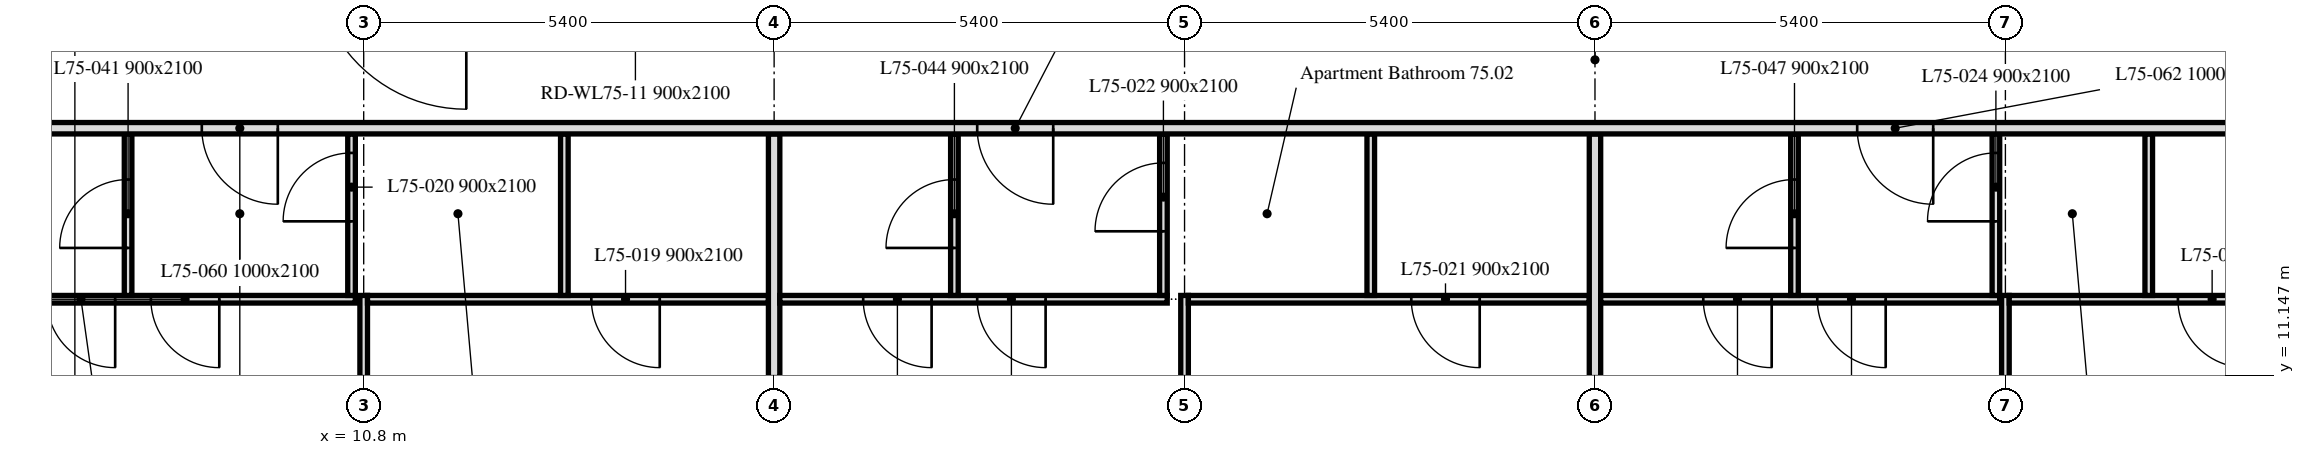
"""IFC4 building model, lengths in metres.
Left out: names, types, materials, properties, quantities, classifications, styles, units other than length and angle.
Written with IfcOpenShell. Run it as: python <this file> out.ifc"""

import sys

from ifc_helpers import new_model, si_unit, direction, frame, frame_2d, origin, place, context, subcontext, project, spatial, rectangle, extrude, element, fill, save


model = new_model("IFC4")
c1 = context("Model", 3, precision=1e-05, world=origin(), true_north=direction((0.0, 1.0)))
c2 = subcontext(c1, "Body", "Model", "MODEL_VIEW")
j1 = project(units=[si_unit("LENGTHUNIT", "METRE"), si_unit("PLANEANGLEUNIT", "RADIAN")], contexts=[c1])
p1 = place(None, origin())
s1 = spatial("IfcSite", under=j1, at=p1, CompositionType="ELEMENT")
p2 = place(p1, origin())
s2 = spatial("IfcBuilding", under=s1, at=p2, CompositionType="ELEMENT")
p3 = place(p2, frame((0.0, 0.0, 301.6)))
s3 = spatial("IfcBuildingStorey", under=s2, at=p3, CompositionType="ELEMENT", Elevation=301.6)
p4 = place(p3, frame((10.8, 11.12, 0.0), z_axis=(0.0, 0.0, 1.0), x_axis=(0.0, 1.0, 0.0)))
e1 = element("IfcWall", 1, at=p4, inside=s3, PredefinedType="PARTITIONING", context=c2, shape_type="SweptSolid", body=[
    extrude(rectangle(XDim=1.08, YDim=0.1, at=frame_2d((0.54, 0.0))), origin(), (0.0, 0.0, 1.0), 3.0),
])
p5 = place(p3, frame((10.69, 12.15, 0.0), z_axis=(0.0, 0.0, 1.0), x_axis=(-1.0, 0.0, 0.0)))
e2 = element("IfcWall", 2, at=p5, inside=s3, PredefinedType="PARTITIONING", context=c2, shape_type="SweptSolid", body=[
    extrude(rectangle(XDim=4.539, YDim=0.1, at=frame_2d((2.27, 0.0))), origin(), (0.0, 0.0, 1.0), 3.0),
])
p6 = place(p5, frame((3.16, 0.0, 0.0)))
e3 = element("IfcOpeningElement", 3, at=p6, cuts=e2, PredefinedType="OPENING", context=c2, shape_type="SweptSolid", body=[
    extrude(rectangle(XDim=0.9, YDim=2.1, at=frame_2d((0.45, 1.05))), frame((0.0, 0.05, 0.0), z_axis=(0.0, -1.0, 0.0), x_axis=(1.0, 0.0, 0.0)), (0.0, 0.0, 1.0), 0.1),
])
p7 = place(p5, frame((1.79, 0.0, 0.0)))
e4 = element("IfcOpeningElement", 4, at=p7, cuts=e2, PredefinedType="OPENING", context=c2, shape_type="SweptSolid", body=[
    extrude(rectangle(XDim=0.9, YDim=2.1, at=frame_2d((0.45, 1.05))), frame((0.0, 0.05, 0.0), z_axis=(0.0, -1.0, 0.0), x_axis=(1.0, 0.0, 0.0)), (0.0, 0.0, 1.0), 0.1),
])
p8 = place(p3, frame((16.125, 12.15, 0.0), z_axis=(0.0, 0.0, 1.0), x_axis=(-1.0, 0.0, 0.0)))
e5 = element("IfcWall", 5, at=p8, inside=s3, PredefinedType="PARTITIONING", context=c2, shape_type="SweptSolid", body=[
    extrude(rectangle(XDim=5.275, YDim=0.1, at=frame_2d((2.637, 0.0))), origin(), (0.0, 0.0, 1.0), 3.0),
])
p9 = place(p8, frame((1.43, 0.0, 0.0)))
e6 = element("IfcOpeningElement", 6, at=p9, cuts=e5, PredefinedType="OPENING", context=c2, shape_type="SweptSolid", body=[
    extrude(rectangle(XDim=0.9, YDim=2.1, at=frame_2d((0.45, 1.05))), frame((0.0, 0.05, 0.0), z_axis=(0.0, -1.0, 0.0), x_axis=(1.0, 0.0, 0.0)), (0.0, 0.0, 1.0), 0.1),
])
p10 = place(p3, frame((7.7, 12.2, 0.0), z_axis=(0.0, 0.0, 1.0), x_axis=(0.0, 1.0, 0.0)))
e7 = element("IfcWall", 7, at=p10, inside=s3, PredefinedType="PARTITIONING", context=c2, shape_type="SweptSolid", body=[
    extrude(rectangle(XDim=2.125, YDim=0.1, at=frame_2d((1.062, 0.0))), origin(), (0.0, 0.0, 1.0), 3.0),
])
p11 = place(p10, frame((0.625, 0.0, 0.0)))
e8 = element("IfcOpeningElement", 8, at=p11, cuts=e7, PredefinedType="OPENING", context=c2, shape_type="SweptSolid", body=[
    extrude(rectangle(XDim=0.9, YDim=2.1, at=frame_2d((0.45, 1.05))), frame((0.0, 0.05, 0.0), z_axis=(0.0, -1.0, 0.0), x_axis=(1.0, 0.0, 0.0)), (0.0, 0.0, 1.0), 0.1),
])
p12 = place(p3, frame((10.64, 12.2, 0.0), z_axis=(0.0, 0.0, 1.0), x_axis=(0.0, 1.0, 0.0)))
e9 = element("IfcWall", 9, at=p12, inside=s3, PredefinedType="PARTITIONING", context=c2, shape_type="SweptSolid", body=[
    extrude(rectangle(XDim=2.125, YDim=0.1, at=frame_2d((1.062, 0.0))), origin(), (0.0, 0.0, 1.0), 3.0),
])
p13 = place(p12, frame((0.975, 0.0, 0.0)))
e10 = element("IfcOpeningElement", 10, at=p13, cuts=e9, PredefinedType="OPENING", context=c2, shape_type="SweptSolid", body=[
    extrude(rectangle(XDim=0.9, YDim=2.1, at=frame_2d((0.45, 1.05))), frame((0.0, 0.05, 0.0), z_axis=(0.0, -1.0, 0.0), x_axis=(1.0, 0.0, 0.0)), (0.0, 0.0, 1.0), 0.1),
])
p14 = place(p3, frame((13.44, 12.2, 0.0), z_axis=(0.0, 0.0, 1.0), x_axis=(0.0, 1.0, 0.0)))
e11 = element("IfcWall", 11, at=p14, inside=s3, PredefinedType="PARTITIONING", context=c2, shape_type="SweptSolid", body=[
    extrude(rectangle(XDim=2.125, YDim=0.1, at=frame_2d((1.062, 0.0))), origin(), (0.0, 0.0, 1.0), 3.0),
])
p15 = place(p3, frame((16.2, 11.12, 0.0), z_axis=(0.0, 0.0, 1.0), x_axis=(0.0, 1.0, 0.0)))
e12 = element("IfcWall", 12, at=p15, inside=s3, PredefinedType="PARTITIONING", context=c2, shape_type="SweptSolid", body=[
    extrude(rectangle(XDim=3.205, YDim=0.15, at=frame_2d((1.603, 0.0))), origin(), (0.0, 0.0, 1.0), 3.0),
])
p16 = place(p3, frame((21.6, 11.12, 0.0), z_axis=(0.0, 0.0, 1.0), x_axis=(0.0, 1.0, 0.0)))
e13 = element("IfcWall", 13, at=p16, inside=s3, PredefinedType="PARTITIONING", context=c2, shape_type="SweptSolid", body=[
    extrude(rectangle(XDim=1.08, YDim=0.1, at=frame_2d((0.54, 0.0))), origin(), (0.0, 0.0, 1.0), 3.0),
])
p17 = place(p3, frame((21.372, 12.15, 0.0), z_axis=(0.0, 0.0, 1.0), x_axis=(-1.0, 0.0, 0.0)))
e14 = element("IfcWall", 14, at=p17, inside=s3, PredefinedType="PARTITIONING", context=c2, shape_type="SweptSolid", body=[
    extrude(rectangle(XDim=5.097, YDim=0.1, at=frame_2d((2.549, 0.0))), origin(), (0.0, 0.0, 1.0), 3.0),
])
p18 = place(p17, frame((3.1, 0.0, 0.0)))
e15 = element("IfcOpeningElement", 15, at=p18, cuts=e14, PredefinedType="OPENING", context=c2, shape_type="SweptSolid", body=[
    extrude(rectangle(XDim=0.9, YDim=2.1, at=frame_2d((0.45, 1.05))), frame((0.0, 0.05, 0.0), z_axis=(0.0, -1.0, 0.0), x_axis=(1.0, 0.0, 0.0)), (0.0, 0.0, 1.0), 0.1),
])
p19 = place(p17, frame((1.6, 0.0, 0.0)))
e16 = element("IfcOpeningElement", 16, at=p19, cuts=e14, PredefinedType="OPENING", context=c2, shape_type="SweptSolid", body=[
    extrude(rectangle(XDim=0.9, YDim=2.1, at=frame_2d((0.45, 1.05))), frame((0.0, 0.05, 0.0), z_axis=(0.0, -1.0, 0.0), x_axis=(1.0, 0.0, 0.0)), (0.0, 0.0, 1.0), 0.1),
])
p20 = place(p3, frame((26.925, 12.15, 0.0), z_axis=(0.0, 0.0, 1.0), x_axis=(-1.0, 0.0, 0.0)))
e17 = element("IfcWall", 17, at=p20, inside=s3, PredefinedType="PARTITIONING", context=c2, shape_type="SweptSolid", body=[
    extrude(rectangle(XDim=5.275, YDim=0.1, at=frame_2d((2.638, 0.0))), origin(), (0.0, 0.0, 1.0), 3.0),
])
p21 = place(p20, frame((1.442, 0.0, 0.0)))
e18 = element("IfcOpeningElement", 18, at=p21, cuts=e17, PredefinedType="OPENING", context=c2, shape_type="SweptSolid", body=[
    extrude(rectangle(XDim=0.9, YDim=2.1, at=frame_2d((0.45, 1.05))), frame((0.0, 0.05, 0.0), z_axis=(0.0, -1.0, 0.0), x_axis=(1.0, 0.0, 0.0)), (0.0, 0.0, 1.0), 0.1),
])
p22 = place(p3, frame((18.572, 12.2, 0.0), z_axis=(0.0, 0.0, 1.0), x_axis=(0.0, 1.0, 0.0)))
e19 = element("IfcWall", 19, at=p22, inside=s3, PredefinedType="PARTITIONING", context=c2, shape_type="SweptSolid", body=[
    extrude(rectangle(XDim=2.125, YDim=0.1, at=frame_2d((1.062, 0.0))), origin(), (0.0, 0.0, 1.0), 3.0),
])
p23 = place(p22, frame((0.625, 0.0, 0.0)))
e20 = element("IfcOpeningElement", 20, at=p23, cuts=e19, PredefinedType="OPENING", context=c2, shape_type="SweptSolid", body=[
    extrude(rectangle(XDim=0.9, YDim=2.1, at=frame_2d((0.45, 1.05))), frame((0.0, 0.05, 0.0), z_axis=(0.0, -1.0, 0.0), x_axis=(1.0, 0.0, 0.0)), (0.0, 0.0, 1.0), 0.1),
])
p24 = place(p3, frame((21.322, 12.2, 0.0), z_axis=(0.0, 0.0, 1.0), x_axis=(0.0, 1.0, 0.0)))
e21 = element("IfcWall", 21, at=p24, inside=s3, PredefinedType="PARTITIONING", context=c2, shape_type="SweptSolid", body=[
    extrude(rectangle(XDim=2.125, YDim=0.1, at=frame_2d((1.062, 0.0))), origin(), (0.0, 0.0, 1.0), 3.0),
])
p25 = place(p24, frame((0.844, 0.0, 0.0)))
e22 = element("IfcOpeningElement", 22, at=p25, cuts=e21, PredefinedType="OPENING", context=c2, shape_type="SweptSolid", body=[
    extrude(rectangle(XDim=0.9, YDim=2.1, at=frame_2d((0.45, 1.05))), frame((0.0, 0.05, 0.0), z_axis=(0.0, -1.0, 0.0), x_axis=(1.0, 0.0, 0.0)), (0.0, 0.0, 1.0), 0.1),
])
p26 = place(p3, frame((24.05, 12.2, 0.0), z_axis=(0.0, 0.0, 1.0), x_axis=(0.0, 1.0, 0.0)))
e23 = element("IfcWall", 23, at=p26, inside=s3, PredefinedType="PARTITIONING", context=c2, shape_type="SweptSolid", body=[
    extrude(rectangle(XDim=2.125, YDim=0.1, at=frame_2d((1.062, 0.0))), origin(), (0.0, 0.0, 1.0), 3.0),
])
p27 = place(p3, frame((27.0, 11.12, 0.0), z_axis=(0.0, 0.0, 1.0), x_axis=(0.0, 1.0, 0.0)))
e24 = element("IfcWall", 24, at=p27, inside=s3, PredefinedType="PARTITIONING", context=c2, shape_type="SweptSolid", body=[
    extrude(rectangle(XDim=3.205, YDim=0.15, at=frame_2d((1.603, 0.0))), origin(), (0.0, 0.0, 1.0), 3.0),
])
p28 = place(p3, frame((32.4, 11.12, 0.0), z_axis=(0.0, 0.0, 1.0), x_axis=(0.0, 1.0, 0.0)))
e25 = element("IfcWall", 25, at=p28, inside=s3, PredefinedType="PARTITIONING", context=c2, shape_type="SweptSolid", body=[
    extrude(rectangle(XDim=1.08, YDim=0.1, at=frame_2d((0.54, 0.0))), origin(), (0.0, 0.0, 1.0), 3.0),
])
p29 = place(p3, frame((32.325, 12.15, 0.0), z_axis=(0.0, 0.0, 1.0), x_axis=(-1.0, 0.0, 0.0)))
e26 = element("IfcWall", 26, at=p29, inside=s3, PredefinedType="PARTITIONING", context=c2, shape_type="SweptSolid", body=[
    extrude(rectangle(XDim=5.25, YDim=0.1, at=frame_2d((2.625, 0.0))), origin(), (0.0, 0.0, 1.0), 3.0),
])
p30 = place(p29, frame((3.0, 0.0, 0.0)))
e27 = element("IfcOpeningElement", 27, at=p30, cuts=e26, PredefinedType="OPENING", context=c2, shape_type="SweptSolid", body=[
    extrude(rectangle(XDim=0.9, YDim=2.1, at=frame_2d((0.45, 1.05))), frame((0.0, 0.05, 0.0), z_axis=(0.0, -1.0, 0.0), x_axis=(1.0, 0.0, 0.0)), (0.0, 0.0, 1.0), 0.1),
])
p31 = place(p29, frame((1.5, 0.0, 0.0)))
e28 = element("IfcOpeningElement", 28, at=p31, cuts=e26, PredefinedType="OPENING", context=c2, shape_type="SweptSolid", body=[
    extrude(rectangle(XDim=0.9, YDim=2.1, at=frame_2d((0.45, 1.05))), frame((0.0, 0.05, 0.0), z_axis=(0.0, -1.0, 0.0), x_axis=(1.0, 0.0, 0.0)), (0.0, 0.0, 1.0), 0.1),
])
p32 = place(p3, frame((37.725, 12.15, 0.0), z_axis=(0.0, 0.0, 1.0), x_axis=(-1.0, 0.0, 0.0)))
e29 = element("IfcWall", 29, at=p32, inside=s3, PredefinedType="PARTITIONING", context=c2, shape_type="SweptSolid", body=[
    extrude(rectangle(XDim=5.275, YDim=0.1, at=frame_2d((2.638, 0.0))), origin(), (0.0, 0.0, 1.0), 3.0),
])
p33 = place(p32, frame((2.155, 0.0, 0.0)))
e30 = element("IfcOpeningElement", 30, at=p33, cuts=e29, PredefinedType="OPENING", context=c2, shape_type="SweptSolid", body=[
    extrude(rectangle(XDim=0.9, YDim=2.1, at=frame_2d((0.45, 1.05))), frame((0.0, 0.05, 0.0), z_axis=(0.0, -1.0, 0.0), x_axis=(1.0, 0.0, 0.0)), (0.0, 0.0, 1.0), 0.1),
])
p34 = place(p3, frame((29.625, 12.2, 0.0), z_axis=(0.0, 0.0, 1.0), x_axis=(0.0, 1.0, 0.0)))
e31 = element("IfcWall", 31, at=p34, inside=s3, PredefinedType="PARTITIONING", context=c2, shape_type="SweptSolid", body=[
    extrude(rectangle(XDim=2.125, YDim=0.1, at=frame_2d((1.062, 0.0))), origin(), (0.0, 0.0, 1.0), 3.0),
])
p35 = place(p34, frame((0.625, 0.0, 0.0)))
e32 = element("IfcOpeningElement", 32, at=p35, cuts=e31, PredefinedType="OPENING", context=c2, shape_type="SweptSolid", body=[
    extrude(rectangle(XDim=0.9, YDim=2.1, at=frame_2d((0.45, 1.05))), frame((0.0, 0.05, 0.0), z_axis=(0.0, -1.0, 0.0), x_axis=(1.0, 0.0, 0.0)), (0.0, 0.0, 1.0), 0.1),
])
p36 = place(p3, frame((32.275, 12.2, 0.0), z_axis=(0.0, 0.0, 1.0), x_axis=(0.0, 1.0, 0.0)))
e33 = element("IfcWall", 33, at=p36, inside=s3, PredefinedType="PARTITIONING", context=c2, shape_type="SweptSolid", body=[
    extrude(rectangle(XDim=2.125, YDim=0.1, at=frame_2d((1.062, 0.0))), origin(), (0.0, 0.0, 1.0), 3.0),
])
p37 = place(p36, frame((0.975, 0.0, 0.0)))
e34 = element("IfcOpeningElement", 34, at=p37, cuts=e33, PredefinedType="OPENING", context=c2, shape_type="SweptSolid", body=[
    extrude(rectangle(XDim=0.9, YDim=2.1, at=frame_2d((0.45, 1.05))), frame((0.0, 0.05, 0.0), z_axis=(0.0, -1.0, 0.0), x_axis=(1.0, 0.0, 0.0)), (0.0, 0.0, 1.0), 0.1),
])
p38 = place(p3, frame((34.286, 12.2, 0.0), z_axis=(0.0, 0.0, 1.0), x_axis=(0.0, 1.0, 0.0)))
e35 = element("IfcWall", 35, at=p38, inside=s3, PredefinedType="PARTITIONING", context=c2, shape_type="SweptSolid", body=[
    extrude(rectangle(XDim=2.125, YDim=0.1, at=frame_2d((1.062, 0.0))), origin(), (0.0, 0.0, 1.0), 3.0),
])
p39 = place(p3, frame((47.849, 14.4, 0.0), z_axis=(0.0, 0.0, 1.0), x_axis=(-1.0, 0.0, 0.0)))
e36 = element("IfcWall", 36, at=p39, inside=s3, PredefinedType="PARTITIONING", context=c2, shape_type="SweptSolid", body=[
    extrude(rectangle(XDim=41.698, YDim=0.15, at=frame_2d((20.849, 0.0))), origin(), (0.0, 0.0, 1.0), 3.0),
])
p40 = place(p39, frame((38.179, 0.0, 0.0)))
e37 = element("IfcOpeningElement", 37, at=p40, cuts=e36, PredefinedType="OPENING", context=c2, shape_type="SweptSolid", body=[
    extrude(rectangle(XDim=1.0, YDim=2.1, at=frame_2d((0.5, 1.05))), frame((0.0, 0.075, 0.0), z_axis=(0.0, -1.0, 0.0), x_axis=(1.0, 0.0, 0.0)), (0.0, 0.0, 1.0), 0.15),
])
p41 = place(p39, frame((27.977, 0.0, 0.0)))
e38 = element("IfcOpeningElement", 38, at=p41, cuts=e36, PredefinedType="OPENING", context=c2, shape_type="SweptSolid", body=[
    extrude(rectangle(XDim=1.0, YDim=2.1, at=frame_2d((0.5, 1.05))), frame((0.0, 0.075, 0.0), z_axis=(0.0, -1.0, 0.0), x_axis=(1.0, 0.0, 0.0)), (0.0, 0.0, 1.0), 0.15),
])
p42 = place(p39, frame((16.399, 0.0, 0.0)))
e39 = element("IfcOpeningElement", 39, at=p42, cuts=e36, PredefinedType="OPENING", context=c2, shape_type="SweptSolid", body=[
    extrude(rectangle(XDim=1.0, YDim=2.1, at=frame_2d((0.5, 1.05))), frame((0.0, 0.075, 0.0), z_axis=(0.0, -1.0, 0.0), x_axis=(1.0, 0.0, 0.0)), (0.0, 0.0, 1.0), 0.15),
])
p43 = place(p39, frame((5.476, 0.0, 0.0)))
e40 = element("IfcOpeningElement", 40, at=p43, cuts=e36, PredefinedType="OPENING", context=c2, shape_type="SweptSolid", body=[
    extrude(rectangle(XDim=1.0, YDim=2.1, at=frame_2d((0.5, 1.05))), frame((0.0, 0.075, 0.0), z_axis=(0.0, -1.0, 0.0), x_axis=(1.0, 0.0, 0.0)), (0.0, 0.0, 1.0), 0.15),
])
p44 = place(p9, origin())
e41 = element("IfcDoor", 41, at=p44, inside=s3, OperationType="SINGLE_SWING_RIGHT", PredefinedType="DOOR", context=c2, shape_type="SweptSolid", body=[
    extrude(rectangle(XDim=0.9, YDim=2.1, at=frame_2d((0.45, 1.05))), frame((0.0, 0.025, 0.0), z_axis=(0.0, -1.0, 0.0), x_axis=(1.0, 0.0, 0.0)), (0.0, 0.0, 1.0), 0.05),
])
fill(e6, e41)
p45 = place(p13, origin())
e42 = element("IfcDoor", 42, at=p45, inside=s3, OperationType="SINGLE_SWING_RIGHT", PredefinedType="DOOR", context=c2, shape_type="SweptSolid", body=[
    extrude(rectangle(XDim=0.9, YDim=2.1, at=frame_2d((0.45, 1.05))), frame((0.0, 0.025, 0.0), z_axis=(0.0, -1.0, 0.0), x_axis=(1.0, 0.0, 0.0)), (0.0, 0.0, 1.0), 0.05),
])
fill(e10, e42)
p46 = place(p21, origin())
e43 = element("IfcDoor", 43, at=p46, inside=s3, OperationType="SINGLE_SWING_RIGHT", PredefinedType="DOOR", context=c2, shape_type="SweptSolid", body=[
    extrude(rectangle(XDim=0.9, YDim=2.1, at=frame_2d((0.45, 1.05))), frame((0.0, 0.025, 0.0), z_axis=(0.0, -1.0, 0.0), x_axis=(1.0, 0.0, 0.0)), (0.0, 0.0, 1.0), 0.05),
])
fill(e18, e43)
p47 = place(p25, origin())
e44 = element("IfcDoor", 44, at=p47, inside=s3, OperationType="SINGLE_SWING_LEFT", PredefinedType="DOOR", context=c2, shape_type="SweptSolid", body=[
    extrude(rectangle(XDim=0.9, YDim=2.1, at=frame_2d((0.45, 1.05))), frame((0.0, 0.025, 0.0), z_axis=(0.0, -1.0, 0.0), x_axis=(1.0, 0.0, 0.0)), (0.0, 0.0, 1.0), 0.05),
])
fill(e22, e44)
p48 = place(p33, origin())
e45 = element("IfcDoor", 45, at=p48, inside=s3, OperationType="SINGLE_SWING_RIGHT", PredefinedType="DOOR", context=c2, shape_type="SweptSolid", body=[
    extrude(rectangle(XDim=0.9, YDim=2.1, at=frame_2d((0.45, 1.05))), frame((0.0, 0.025, 0.0), z_axis=(0.0, -1.0, 0.0), x_axis=(1.0, 0.0, 0.0)), (0.0, 0.0, 1.0), 0.05),
])
fill(e30, e45)
p49 = place(p37, origin())
e46 = element("IfcDoor", 46, at=p49, inside=s3, OperationType="SINGLE_SWING_RIGHT", PredefinedType="DOOR", context=c2, shape_type="SweptSolid", body=[
    extrude(rectangle(XDim=0.9, YDim=2.1, at=frame_2d((0.45, 1.05))), frame((0.0, 0.025, 0.0), z_axis=(0.0, -1.0, 0.0), x_axis=(1.0, 0.0, 0.0)), (0.0, 0.0, 1.0), 0.05),
])
fill(e34, e46)
p50 = place(p6, origin())
e47 = element("IfcDoor", 47, at=p50, inside=s3, OperationType="SINGLE_SWING_LEFT", PredefinedType="DOOR", context=c2, shape_type="SweptSolid", body=[
    extrude(rectangle(XDim=0.9, YDim=2.1, at=frame_2d((0.45, 1.05))), frame((0.0, 0.025, 0.0), z_axis=(0.0, -1.0, 0.0), x_axis=(1.0, 0.0, 0.0)), (0.0, 0.0, 1.0), 0.05),
])
fill(e3, e47)
p51 = place(p11, origin())
e48 = element("IfcDoor", 48, at=p51, inside=s3, OperationType="SINGLE_SWING_RIGHT", PredefinedType="DOOR", context=c2, shape_type="SweptSolid", body=[
    extrude(rectangle(XDim=0.9, YDim=2.1, at=frame_2d((0.45, 1.05))), frame((0.0, 0.025, 0.0), z_axis=(0.0, -1.0, 0.0), x_axis=(1.0, 0.0, 0.0)), (0.0, 0.0, 1.0), 0.05),
])
fill(e8, e48)
p52 = place(p18, origin())
e49 = element("IfcDoor", 49, at=p52, inside=s3, OperationType="SINGLE_SWING_LEFT", PredefinedType="DOOR", context=c2, shape_type="SweptSolid", body=[
    extrude(rectangle(XDim=0.9, YDim=2.1, at=frame_2d((0.45, 1.05))), frame((0.0, 0.025, 0.0), z_axis=(0.0, -1.0, 0.0), x_axis=(1.0, 0.0, 0.0)), (0.0, 0.0, 1.0), 0.05),
])
fill(e15, e49)
p53 = place(p23, origin())
e50 = element("IfcDoor", 50, at=p53, inside=s3, OperationType="SINGLE_SWING_LEFT", PredefinedType="DOOR", context=c2, shape_type="SweptSolid", body=[
    extrude(rectangle(XDim=0.9, YDim=2.1, at=frame_2d((0.45, 1.05))), frame((0.0, 0.025, 0.0), z_axis=(0.0, -1.0, 0.0), x_axis=(1.0, 0.0, 0.0)), (0.0, 0.0, 1.0), 0.05),
])
fill(e20, e50)
p54 = place(p30, origin())
e51 = element("IfcDoor", 51, at=p54, inside=s3, OperationType="SINGLE_SWING_LEFT", PredefinedType="DOOR", context=c2, shape_type="SweptSolid", body=[
    extrude(rectangle(XDim=0.9, YDim=2.1, at=frame_2d((0.45, 1.05))), frame((0.0, 0.025, 0.0), z_axis=(0.0, -1.0, 0.0), x_axis=(1.0, 0.0, 0.0)), (0.0, 0.0, 1.0), 0.05),
])
fill(e27, e51)
p55 = place(p35, origin())
e52 = element("IfcDoor", 52, at=p55, inside=s3, OperationType="SINGLE_SWING_RIGHT", PredefinedType="DOOR", context=c2, shape_type="SweptSolid", body=[
    extrude(rectangle(XDim=0.9, YDim=2.1, at=frame_2d((0.45, 1.05))), frame((0.0, 0.025, 0.0), z_axis=(0.0, -1.0, 0.0), x_axis=(1.0, 0.0, 0.0)), (0.0, 0.0, 1.0), 0.05),
])
fill(e32, e52)
p56 = place(p7, origin())
e53 = element("IfcDoor", 53, at=p56, inside=s3, OperationType="SINGLE_SWING_RIGHT", PredefinedType="DOOR", context=c2, shape_type="SweptSolid", body=[
    extrude(rectangle(XDim=0.9, YDim=2.1, at=frame_2d((0.45, 1.05))), frame((0.0, 0.025, 0.0), z_axis=(0.0, -1.0, 0.0), x_axis=(1.0, 0.0, 0.0)), (0.0, 0.0, 1.0), 0.05),
])
fill(e4, e53)
p57 = place(p19, origin())
e54 = element("IfcDoor", 54, at=p57, inside=s3, OperationType="SINGLE_SWING_RIGHT", PredefinedType="DOOR", context=c2, shape_type="SweptSolid", body=[
    extrude(rectangle(XDim=0.9, YDim=2.1, at=frame_2d((0.45, 1.05))), frame((0.0, 0.025, 0.0), z_axis=(0.0, -1.0, 0.0), x_axis=(1.0, 0.0, 0.0)), (0.0, 0.0, 1.0), 0.05),
])
fill(e16, e54)
p58 = place(p31, origin())
e55 = element("IfcDoor", 55, at=p58, inside=s3, OperationType="SINGLE_SWING_RIGHT", PredefinedType="DOOR", context=c2, shape_type="SweptSolid", body=[
    extrude(rectangle(XDim=0.9, YDim=2.1, at=frame_2d((0.45, 1.05))), frame((0.0, 0.025, 0.0), z_axis=(0.0, -1.0, 0.0), x_axis=(1.0, 0.0, 0.0)), (0.0, 0.0, 1.0), 0.05),
])
fill(e28, e55)
p59 = place(p40, origin())
e56 = element("IfcDoor", 56, at=p59, inside=s3, OperationType="SINGLE_SWING_RIGHT", PredefinedType="DOOR", context=c2, shape_type="SweptSolid", body=[
    extrude(rectangle(XDim=1.0, YDim=2.1, at=frame_2d((0.5, 1.05))), frame((0.0, 0.025, 0.0), z_axis=(0.0, -1.0, 0.0), x_axis=(1.0, 0.0, 0.0)), (0.0, 0.0, 1.0), 0.05),
])
fill(e37, e56)
p60 = place(p41, origin())
e57 = element("IfcDoor", 57, at=p60, inside=s3, OperationType="SINGLE_SWING_RIGHT", PredefinedType="DOOR", context=c2, shape_type="SweptSolid", body=[
    extrude(rectangle(XDim=1.0, YDim=2.1, at=frame_2d((0.5, 1.05))), frame((0.0, 0.025, 0.0), z_axis=(0.0, -1.0, 0.0), x_axis=(1.0, 0.0, 0.0)), (0.0, 0.0, 1.0), 0.05),
])
fill(e38, e57)
p61 = place(p42, origin())
e58 = element("IfcDoor", 58, at=p61, inside=s3, OperationType="SINGLE_SWING_LEFT", PredefinedType="DOOR", context=c2, shape_type="SweptSolid", body=[
    extrude(rectangle(XDim=1.0, YDim=2.1, at=frame_2d((0.5, 1.05))), frame((0.0, 0.025, 0.0), z_axis=(0.0, -1.0, 0.0), x_axis=(1.0, 0.0, 0.0)), (0.0, 0.0, 1.0), 0.05),
])
fill(e39, e58)
save(model, sys.argv[1])
